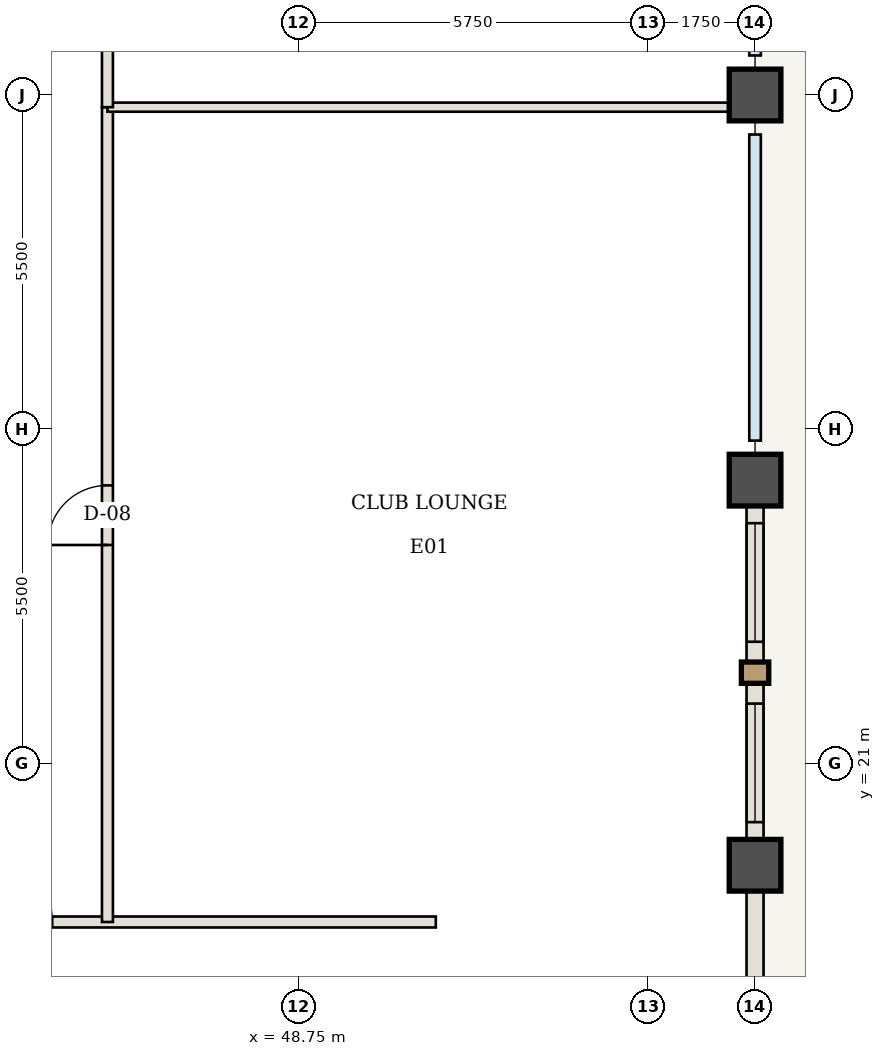
"""IFC4 building model, lengths in metres.
Left out: names, types, materials, properties, quantities, classifications, styles, units other than length and angle.
Written with IfcOpenShell. Run it as: python <this file> out.ifc"""

import sys

from ifc_helpers import new_model, si_unit, direction, frame, frame_2d, origin, origin_2d, place, context, subcontext, project, spatial, rectangle, extrude, element, fill, save


model = new_model("IFC4")
c1 = context("Model", 3, precision=1e-05, world=origin(), true_north=direction((0.0, 1.0)))
c2 = subcontext(c1, "Body", "Model", "MODEL_VIEW")
j1 = project(units=[si_unit("LENGTHUNIT", "METRE"), si_unit("PLANEANGLEUNIT", "RADIAN")], contexts=[c1])
p1 = place(None, origin())
s1 = spatial("IfcSite", under=j1, at=p1, CompositionType="ELEMENT")
p2 = place(p1, origin())
s2 = spatial("IfcBuilding", under=s1, at=p2, CompositionType="ELEMENT")
p3 = place(p2, frame((0.0, 0.0, 182.35)))
s3 = spatial("IfcBuildingStorey", under=s2, at=p3, CompositionType="ELEMENT", Elevation=182.35)
for number, where, z_axis, x_axis in (
    (1, (56.25, 19.333, -0.42), (0.0, 0.0, 1.0), (1.0, 0.0, 0.0)),
    (2, (56.25, 25.667, -0.42), (0.0, 0.0, 1.0), (1.0, 0.0, 0.0)),
    (3, (56.25, 32.0, -0.42), (0.0, 0.0, 1.0), (1.0, 0.0, 0.0)),
):
    element("IfcColumn", number, at=place(p3, frame(where, z_axis=z_axis, x_axis=x_axis)), inside=s3, PredefinedType="COLUMN", context=c2, shape_type="SweptSolid", body=[
        extrude(rectangle(XDim=0.85, YDim=0.85, at=origin_2d()), origin(), (0.0, 0.0, 1.0), 4.97),
    ])
p4 = place(p3, frame((38.333, 18.4, 0.0), z_axis=(0.0, 0.0, 1.0), x_axis=(1.0, 0.0, 0.0)))
e4 = element("IfcWall", 4, at=p4, inside=s3, PredefinedType="STANDARD", context=c2, shape_type="SweptSolid", body=[
    extrude(rectangle(XDim=12.667, YDim=0.18, at=frame_2d((6.333, 0.0))), origin(), (0.0, 0.0, 1.0), 4.13),
])
p5 = place(p4, frame((4.558, 0.0, 0.0)))
e5 = element("IfcOpeningElement", 5, at=p5, cuts=e4, PredefinedType="OPENING", context=c2, shape_type="SweptSolid", body=[
    extrude(rectangle(XDim=1.8, YDim=2.35, at=frame_2d((0.9, 1.175))), frame((0.0, 0.1, 0.0), z_axis=(0.0, -1.0, 0.0), x_axis=(1.0, 0.0, 0.0)), (0.0, 0.0, 1.0), 0.2),
])
p6 = place(p3, frame((45.6, 18.4, 0.0), z_axis=(0.0, 0.0, 1.0), x_axis=(0.0, 1.0, 0.0)))
e6 = element("IfcWall", 6, at=p6, inside=s3, PredefinedType="STANDARD", context=c2, shape_type="SweptSolid", body=[
    extrude(rectangle(XDim=13.4, YDim=0.18, at=frame_2d((6.7, 0.0))), origin(), (0.0, 0.0, 1.0), 4.13),
])
p7 = place(p6, frame((6.2, 0.0, 0.0)))
e7 = element("IfcOpeningElement", 7, at=p7, cuts=e6, PredefinedType="OPENING", context=c2, shape_type="SweptSolid", body=[
    extrude(rectangle(XDim=0.98, YDim=2.2, at=frame_2d((0.49, 1.1))), frame((0.0, 0.1, 0.0), z_axis=(0.0, -1.0, 0.0), x_axis=(1.0, 0.0, 0.0)), (0.0, 0.0, 1.0), 0.2),
])
p8 = place(p3, frame((45.6, 31.8, 0.0), z_axis=(0.0, 0.0, 1.0), x_axis=(1.0, 0.0, 0.0)))
e8 = element("IfcWall", 8, at=p8, inside=s3, PredefinedType="STANDARD", context=c2, shape_type="SweptSolid", body=[
    extrude(rectangle(XDim=10.59, YDim=0.15, at=frame_2d((5.295, 0.0))), origin(), (0.0, 0.0, 1.0), 3.579),
])
p9 = place(p3, frame((45.6, 31.8, 0.0), z_axis=(0.0, 0.0, 1.0), x_axis=(0.0, 1.0, 0.0)))
e9 = element("IfcWall", 9, at=p9, inside=s3, PredefinedType="STANDARD", context=c2, shape_type="SweptSolid", body=[
    extrude(rectangle(XDim=13.8, YDim=0.18, at=frame_2d((6.9, 0.0))), origin(), (0.0, 0.0, 1.0), 4.13),
])
p10 = place(p9, frame((6.4, 0.0, 0.0)))
e10 = element("IfcOpeningElement", 10, at=p10, cuts=e9, PredefinedType="OPENING", context=c2, shape_type="SweptSolid", body=[
    extrude(rectangle(XDim=0.98, YDim=2.2, at=frame_2d((0.49, 1.1))), frame((0.0, 0.1, 0.0), z_axis=(0.0, -1.0, 0.0), x_axis=(1.0, 0.0, 0.0)), (0.0, 0.0, 1.0), 0.2),
])
p11 = place(p3, frame((56.25, 19.333, 0.0), z_axis=(0.0, 0.0, 1.0), x_axis=(0.0, -1.0, 0.0)))
e11 = element("IfcWall", 11, at=p11, inside=s3, PredefinedType="USERDEFINED", context=c2, shape_type="SweptSolid", body=[
    extrude(rectangle(XDim=6.333, YDim=0.28, at=frame_2d((3.167, 0.0))), origin(), (0.0, 0.0, 1.0), 3.43),
])
p12 = place(p3, frame((56.25, 25.667, 0.0), z_axis=(0.0, 0.0, 1.0), x_axis=(0.0, -1.0, 0.0)))
e12 = element("IfcWall", 12, at=p12, inside=s3, PredefinedType="USERDEFINED", context=c2, shape_type="SweptSolid", body=[
    extrude(rectangle(XDim=6.333, YDim=0.28, at=frame_2d((3.167, 0.0))), origin(), (0.0, 0.0, 1.0), 3.43),
])
p13 = place(p12, frame((0.708, 0.0, 0.85)))
e13 = element("IfcOpeningElement", 13, at=p13, cuts=e12, PredefinedType="OPENING", context=c2, shape_type="SweptSolid", body=[
    extrude(rectangle(XDim=1.95, YDim=2.2, at=frame_2d((0.975, 1.1))), frame((0.0, 0.15, 0.0), z_axis=(0.0, -1.0, 0.0), x_axis=(1.0, 0.0, 0.0)), (0.0, 0.0, 1.0), 0.3),
])
p14 = place(p12, frame((3.675, 0.0, 0.85)))
e14 = element("IfcOpeningElement", 14, at=p14, cuts=e12, PredefinedType="OPENING", context=c2, shape_type="SweptSolid", body=[
    extrude(rectangle(XDim=1.95, YDim=2.2, at=frame_2d((0.975, 1.1))), frame((0.0, 0.15, 0.0), z_axis=(0.0, -1.0, 0.0), x_axis=(1.0, 0.0, 0.0)), (0.0, 0.0, 1.0), 0.3),
])
p15 = place(p7, origin())
e15 = element("IfcDoor", 15, at=p15, inside=s3, OperationType="SINGLE_SWING_LEFT", PredefinedType="DOOR", context=c2, shape_type="SweptSolid", body=[
    extrude(rectangle(XDim=0.98, YDim=2.2, at=frame_2d((0.49, 1.1))), frame((0.0, 0.025, 0.0), z_axis=(0.0, -1.0, 0.0), x_axis=(1.0, 0.0, 0.0)), (0.0, 0.0, 1.0), 0.05),
])
fill(e7, e15)
p16 = place(p13, origin())
e16 = element("IfcWindow", 16, at=p16, inside=s3, PartitioningType="SINGLE_PANEL", PredefinedType="WINDOW", context=c2, shape_type="SweptSolid", body=[
    extrude(rectangle(XDim=1.95, YDim=2.2, at=frame_2d((0.975, 1.1))), frame((0.0, 0.03, 0.0), z_axis=(0.0, -1.0, 0.0), x_axis=(1.0, 0.0, 0.0)), (0.0, 0.0, 1.0), 0.06),
])
fill(e13, e16)
p17 = place(p14, origin())
e17 = element("IfcWindow", 17, at=p17, inside=s3, PartitioningType="SINGLE_PANEL", PredefinedType="WINDOW", context=c2, shape_type="SweptSolid", body=[
    extrude(rectangle(XDim=1.95, YDim=2.2, at=frame_2d((0.975, 1.1))), frame((0.0, 0.03, 0.0), z_axis=(0.0, -1.0, 0.0), x_axis=(1.0, 0.0, 0.0)), (0.0, 0.0, 1.0), 0.06),
])
fill(e14, e17)
save(model, sys.argv[1])
